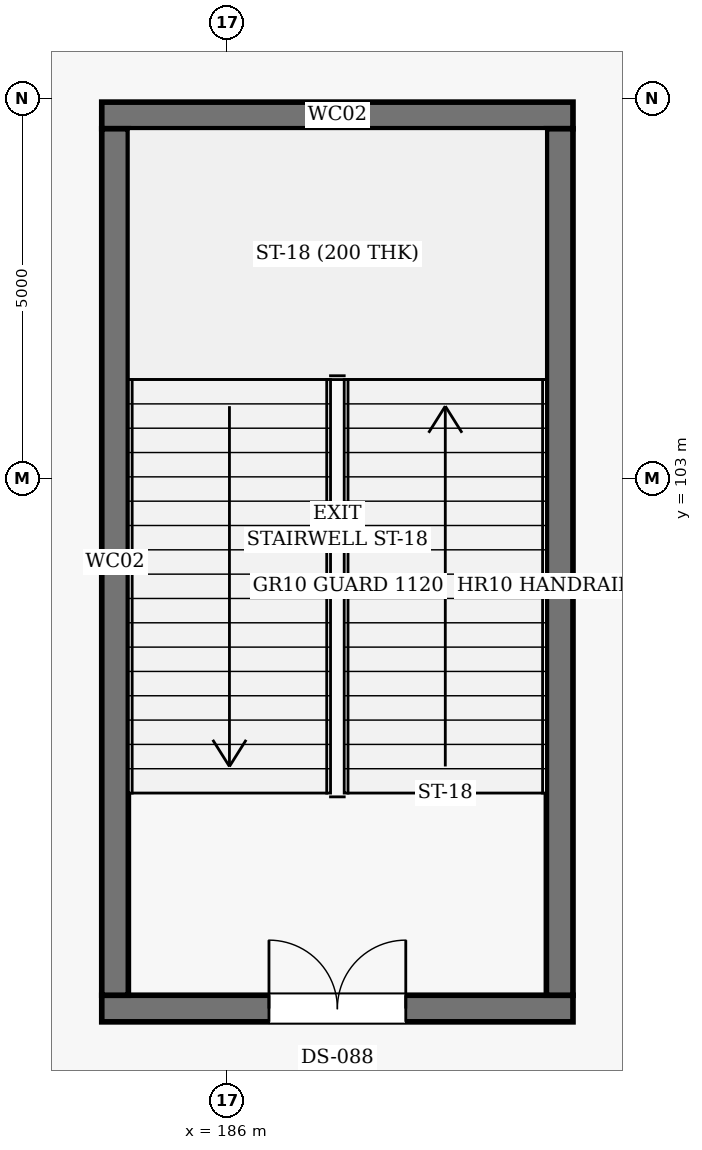
"""IFC4 building model, lengths in metres.
Left out: names, types, materials, properties, quantities, classifications, styles, units other than length and angle.
Written with IfcOpenShell. Run it as: python <this file> out.ifc"""

import sys

from ifc_helpers import new_model, si_unit, direction, frame, frame_2d, origin, place, context, subcontext, project, spatial, rectangle, extrude, element, fill, save


model = new_model("IFC4")
c1 = context("Model", 3, precision=1e-05, world=origin(), true_north=direction((0.0, 1.0)))
c2 = subcontext(c1, "Body", "Model", "MODEL_VIEW")
j1 = project(units=[si_unit("LENGTHUNIT", "METRE"), si_unit("PLANEANGLEUNIT", "RADIAN")], contexts=[c1])
p1 = place(None, origin())
s1 = spatial("IfcSite", under=j1, at=p1, CompositionType="ELEMENT")
p2 = place(p1, origin())
s2 = spatial("IfcBuilding", under=s1, at=p2, CompositionType="ELEMENT")
p3 = place(p2, frame((0.0, 0.0, -5.4)))
s3 = spatial("IfcBuildingStorey", under=s2, at=p3, CompositionType="ELEMENT", Elevation=-5.4)
p4 = place(p3, frame((184.35, 96.025, 0.0), z_axis=(0.0, 0.0, 1.0), x_axis=(1.0, 0.0, 0.0)))
e1 = element("IfcWall", 1, at=p4, inside=s3, PredefinedType="SHEAR", context=c2, shape_type="SweptSolid", body=[
    extrude(rectangle(XDim=6.2, YDim=0.35, at=frame_2d((3.1, 0.0))), origin(), (0.0, 0.0, 1.0), 5.12),
])
p5 = place(p4, frame((2.2, 0.0, 0.0)))
e2 = element("IfcOpeningElement", 2, at=p5, cuts=e1, PredefinedType="OPENING", context=c2, shape_type="SweptSolid", body=[
    extrude(rectangle(XDim=1.8, YDim=2.2, at=frame_2d((0.9, 1.1))), frame((0.0, 0.185, 0.0), z_axis=(0.0, -1.0, 0.0), x_axis=(1.0, 0.0, 0.0)), (0.0, 0.0, 1.0), 0.37),
])
p6 = place(p3, frame((190.55, 107.775, 0.0), z_axis=(0.0, 0.0, 1.0), x_axis=(-1.0, 0.0, 0.0)))
e3 = element("IfcWall", 3, at=p6, inside=s3, PredefinedType="SHEAR", context=c2, shape_type="SweptSolid", body=[
    extrude(rectangle(XDim=6.2, YDim=0.35, at=frame_2d((3.1, 0.0))), origin(), (0.0, 0.0, 1.0), 5.12),
])
for number, where, z_axis, x_axis in (
    (4, (184.525, 107.6, 0.0), (0.0, 0.0, 1.0), (0.0, -1.0, 0.0)),
    (5, (190.375, 96.2, 0.0), (0.0, 0.0, 1.0), (0.0, 1.0, 0.0)),
):
    element("IfcWall", number, at=place(p3, frame(where, z_axis=z_axis, x_axis=x_axis)), inside=s3, PredefinedType="SHEAR", context=c2, shape_type="SweptSolid", body=[
        extrude(rectangle(XDim=11.4, YDim=0.35, at=frame_2d((5.7, 0.0))), origin(), (0.0, 0.0, 1.0), 5.12),
    ])
p7 = place(p5, origin())
e6 = element("IfcDoor", 6, at=p7, inside=s3, OperationType="DOUBLE_DOOR_SINGLE_SWING", PredefinedType="DOOR", context=c2, shape_type="SweptSolid", body=[
    extrude(rectangle(XDim=1.8, YDim=2.2, at=frame_2d((0.9, 1.1))), frame((0.0, 0.025, 0.0), z_axis=(0.0, -1.0, 0.0), x_axis=(1.0, 0.0, 0.0)), (0.0, 0.0, 1.0), 0.05),
])
fill(e2, e6)
save(model, sys.argv[1])
